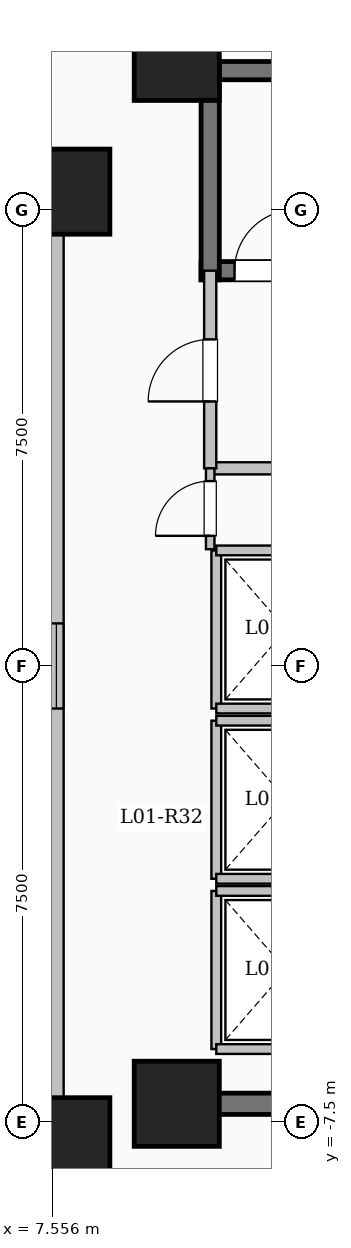
"""IFC4 building model, lengths in metres.
Left out: names, types, materials, properties, quantities, classifications, styles, units other than length and angle.
Written with IfcOpenShell. Run it as: python <this file> out.ifc"""

import sys

from ifc_helpers import new_model, si_unit, direction, frame, frame_2d, origin, origin_2d, place, context, subcontext, project, spatial, rectangle, extrude, element, fill, save


model = new_model("IFC4")
c1 = context("Model", 3, precision=1e-05, world=origin(), true_north=direction((0.0, 1.0)))
c2 = subcontext(c1, "Body", "Model", "MODEL_VIEW")
j1 = project(units=[si_unit("LENGTHUNIT", "METRE"), si_unit("PLANEANGLEUNIT", "RADIAN")], contexts=[c1])
p1 = place(None, origin())
s1 = spatial("IfcSite", under=j1, at=p1, CompositionType="ELEMENT")
p2 = place(p1, origin())
s2 = spatial("IfcBuilding", under=s1, at=p2, CompositionType="ELEMENT")
p3 = place(p2, frame((0.0, 0.0, 5.4)))
s3 = spatial("IfcBuildingStorey", under=s2, at=p3, CompositionType="ELEMENT", Elevation=5.4)
for number, where, z_axis, x_axis in (
    (1, (7.8, -7.8, 0.0), (0.0, 0.0, 1.0), (1.0, 0.0, 0.0)),
    (2, (7.8, 7.8, 0.0), (0.0, 0.0, 1.0), (1.0, 0.0, 0.0)),
    (3, (9.6, -7.2, 0.0), (0.0, 0.0, 1.0), (1.0, 0.0, 0.0)),
    (4, (9.6, 10.0, 0.0), (0.0, 0.0, 1.0), (1.0, 0.0, 0.0)),
):
    element("IfcColumn", number, at=place(p3, frame(where, z_axis=z_axis, x_axis=x_axis)), inside=s3, PredefinedType="COLUMN", context=c2, shape_type="SweptSolid", body=[
        extrude(rectangle(XDim=1.4, YDim=1.4, at=origin_2d()), origin(), (0.0, 0.0, 1.0), 4.5),
    ])
p4 = place(p3, frame((-7.62, -7.62, 0.0), z_axis=(0.0, 0.0, 1.0), x_axis=(1.0, 0.0, 0.0)))
e5 = element("IfcWall", 5, at=p4, inside=s3, PredefinedType="SOLIDWALL", context=c2, shape_type="SweptSolid", body=[
    extrude(rectangle(XDim=15.24, YDim=0.24, at=frame_2d((7.62, 0.0))), origin(), (0.0, 0.0, 1.0), 4.2),
])
p5 = place(p4, frame((6.92, 0.0, 0.95)))
e6 = element("IfcOpeningElement", 6, at=p5, cuts=e5, PredefinedType="OPENING", context=c2, shape_type="SweptSolid", body=[
    extrude(rectangle(XDim=1.4, YDim=1.5, at=frame_2d((0.7, 0.75))), frame((0.0, 0.13, 0.0), z_axis=(0.0, -1.0, 0.0), x_axis=(1.0, 0.0, 0.0)), (0.0, 0.0, 1.0), 0.26),
])
p6 = place(p3, frame((7.62, -7.62, 0.0), z_axis=(0.0, 0.0, 1.0), x_axis=(0.0, 1.0, 0.0)))
e7 = element("IfcWall", 7, at=p6, inside=s3, PredefinedType="SOLIDWALL", context=c2, shape_type="SweptSolid", body=[
    extrude(rectangle(XDim=15.24, YDim=0.24, at=frame_2d((7.62, 0.0))), origin(), (0.0, 0.0, 1.0), 4.2),
])
p7 = place(p6, frame((6.92, 0.0, 0.95)))
e8 = element("IfcOpeningElement", 8, at=p7, cuts=e7, PredefinedType="OPENING", context=c2, shape_type="SweptSolid", body=[
    extrude(rectangle(XDim=1.4, YDim=1.5, at=frame_2d((0.7, 0.75))), frame((0.0, 0.13, 0.0), z_axis=(0.0, -1.0, 0.0), x_axis=(1.0, 0.0, 0.0)), (0.0, 0.0, 1.0), 0.26),
])
p8 = place(p3, frame((7.62, 7.62, 0.0), z_axis=(0.0, 0.0, 1.0), x_axis=(-1.0, 0.0, 0.0)))
e9 = element("IfcWall", 9, at=p8, inside=s3, PredefinedType="SOLIDWALL", context=c2, shape_type="SweptSolid", body=[
    extrude(rectangle(XDim=15.24, YDim=0.24, at=frame_2d((7.62, 0.0))), origin(), (0.0, 0.0, 1.0), 4.2),
])
p9 = place(p8, frame((6.92, 0.0, 0.95)))
e10 = element("IfcOpeningElement", 10, at=p9, cuts=e9, PredefinedType="OPENING", context=c2, shape_type="SweptSolid", body=[
    extrude(rectangle(XDim=1.4, YDim=1.5, at=frame_2d((0.7, 0.75))), frame((0.0, 0.13, 0.0), z_axis=(0.0, -1.0, 0.0), x_axis=(1.0, 0.0, 0.0)), (0.0, 0.0, 1.0), 0.26),
])
p10 = place(p3, frame((10.0, 9.79, 0.0), z_axis=(0.0, 0.0, 1.0), x_axis=(1.0, 0.0, 0.0)))
e11 = element("IfcWall", 11, at=p10, inside=s3, PredefinedType="SHEAR", context=c2, shape_type="SweptSolid", body=[
    extrude(rectangle(XDim=8.0, YDim=0.3, at=frame_2d((4.0, 0.0))), origin(), (0.0, 0.0, 1.0), 4.5),
])
p11 = place(p3, frame((10.0, 6.5, 0.0), z_axis=(0.0, 0.0, 1.0), x_axis=(1.0, 0.0, 0.0)))
e12 = element("IfcWall", 12, at=p11, inside=s3, PredefinedType="SHEAR", context=c2, shape_type="SweptSolid", body=[
    extrude(rectangle(XDim=8.0, YDim=0.3, at=frame_2d((4.0, 0.0))), origin(), (0.0, 0.0, 1.0), 4.5),
])
p12 = place(p11, frame((0.55, 0.0, 0.0)))
e13 = element("IfcOpeningElement", 13, at=p12, cuts=e12, PredefinedType="OPENING", context=c2, shape_type="SweptSolid", body=[
    extrude(rectangle(XDim=1.0, YDim=2.15, at=frame_2d((0.5, 1.075))), frame((0.0, 0.16, 0.0), z_axis=(0.0, -1.0, 0.0), x_axis=(1.0, 0.0, 0.0)), (0.0, 0.0, 1.0), 0.32),
])
p13 = place(p3, frame((10.15, 6.35, 0.0), z_axis=(0.0, 0.0, 1.0), x_axis=(0.0, 1.0, 0.0)))
e14 = element("IfcWall", 14, at=p13, inside=s3, PredefinedType="SHEAR", context=c2, shape_type="SweptSolid", body=[
    extrude(rectangle(XDim=3.59, YDim=0.3, at=frame_2d((1.795, 0.0))), origin(), (0.0, 0.0, 1.0), 4.5),
])
p14 = place(p3, frame((10.15, 3.25, 0.0), z_axis=(0.0, 0.0, 1.0), x_axis=(1.0, 0.0, 0.0)))
e15 = element("IfcWall", 15, at=p14, inside=s3, PredefinedType="SOLIDWALL", context=c2, shape_type="SweptSolid", body=[
    extrude(rectangle(XDim=5.4, YDim=0.2, at=frame_2d((2.7, 0.0))), origin(), (0.0, 0.0, 1.0), 4.2),
])
p15 = place(p3, frame((10.15, 3.25, 0.0), z_axis=(0.0, 0.0, 1.0), x_axis=(0.0, 1.0, 0.0)))
e16 = element("IfcWall", 16, at=p15, inside=s3, PredefinedType="SOLIDWALL", context=c2, shape_type="SweptSolid", body=[
    extrude(rectangle(XDim=3.25, YDim=0.2, at=frame_2d((1.625, 0.0))), origin(), (0.0, 0.0, 1.0), 4.2),
])
p16 = place(p15, frame((1.1, 0.0, 0.0)))
e17 = element("IfcOpeningElement", 17, at=p16, cuts=e16, PredefinedType="OPENING", context=c2, shape_type="SweptSolid", body=[
    extrude(rectangle(XDim=1.02, YDim=2.15, at=frame_2d((0.51, 1.075))), frame((0.0, 0.11, 0.0), z_axis=(0.0, -1.0, 0.0), x_axis=(1.0, 0.0, 0.0)), (0.0, 0.0, 1.0), 0.22),
])
p17 = place(p3, frame((10.25, -6.3, 0.0), z_axis=(0.0, 0.0, 1.0), x_axis=(0.0, 1.0, 0.0)))
e18 = element("IfcWall", 18, at=p17, inside=s3, PredefinedType="SOLIDWALL", context=c2, shape_type="SweptSolid", body=[
    extrude(rectangle(XDim=2.6, YDim=0.16, at=frame_2d((1.3, 0.0))), origin(), (0.0, 0.0, 1.0), 4.2),
])
for number, where, z_axis, x_axis in (
    (19, (10.25, -6.3, 0.0), (0.0, 0.0, 1.0), (1.0, 0.0, 0.0)),
    (20, (10.25, -3.7, 0.0), (0.0, 0.0, 1.0), (1.0, 0.0, 0.0)),
):
    element("IfcWall", number, at=place(p3, frame(where, z_axis=z_axis, x_axis=x_axis)), inside=s3, PredefinedType="SOLIDWALL", context=c2, shape_type="SweptSolid", body=[
        extrude(rectangle(XDim=2.3, YDim=0.16, at=frame_2d((1.15, 0.0))), origin(), (0.0, 0.0, 1.0), 4.2),
    ])
p18 = place(p3, frame((10.25, -3.5, 0.0), z_axis=(0.0, 0.0, 1.0), x_axis=(0.0, 1.0, 0.0)))
e21 = element("IfcWall", 21, at=p18, inside=s3, PredefinedType="SOLIDWALL", context=c2, shape_type="SweptSolid", body=[
    extrude(rectangle(XDim=2.6, YDim=0.16, at=frame_2d((1.3, 0.0))), origin(), (0.0, 0.0, 1.0), 4.2),
])
for number, where, z_axis, x_axis in (
    (22, (10.25, -3.5, 0.0), (0.0, 0.0, 1.0), (1.0, 0.0, 0.0)),
    (23, (10.25, -0.9, 0.0), (0.0, 0.0, 1.0), (1.0, 0.0, 0.0)),
):
    element("IfcWall", number, at=place(p3, frame(where, z_axis=z_axis, x_axis=x_axis)), inside=s3, PredefinedType="SOLIDWALL", context=c2, shape_type="SweptSolid", body=[
        extrude(rectangle(XDim=2.3, YDim=0.16, at=frame_2d((1.15, 0.0))), origin(), (0.0, 0.0, 1.0), 4.2),
    ])
p19 = place(p3, frame((10.25, -0.7, 0.0), z_axis=(0.0, 0.0, 1.0), x_axis=(0.0, 1.0, 0.0)))
e24 = element("IfcWall", 24, at=p19, inside=s3, PredefinedType="SOLIDWALL", context=c2, shape_type="SweptSolid", body=[
    extrude(rectangle(XDim=2.6, YDim=0.16, at=frame_2d((1.3, 0.0))), origin(), (0.0, 0.0, 1.0), 4.2),
])
for number, where, z_axis, x_axis in (
    (25, (10.25, -0.7, 0.0), (0.0, 0.0, 1.0), (1.0, 0.0, 0.0)),
    (26, (10.25, 1.9, 0.0), (0.0, 0.0, 1.0), (1.0, 0.0, 0.0)),
):
    element("IfcWall", number, at=place(p3, frame(where, z_axis=z_axis, x_axis=x_axis)), inside=s3, PredefinedType="SOLIDWALL", context=c2, shape_type="SweptSolid", body=[
        extrude(rectangle(XDim=2.3, YDim=0.16, at=frame_2d((1.15, 0.0))), origin(), (0.0, 0.0, 1.0), 4.2),
    ])
p20 = place(p3, frame((10.075, -7.2, 0.0), z_axis=(0.0, 0.0, 1.0), x_axis=(1.0, 0.0, 0.0)))
e27 = element("IfcWall", 27, at=p20, inside=s3, PredefinedType="SHEAR", context=c2, shape_type="SweptSolid", body=[
    extrude(rectangle(XDim=8.55, YDim=0.35, at=frame_2d((4.275, 0.0))), origin(), (0.0, 0.0, 1.0), 4.5),
])
p21 = place(p3, frame((10.15, 1.92, 0.0), z_axis=(0.0, 0.0, 1.0), x_axis=(0.0, 1.0, 0.0)))
e28 = element("IfcWall", 28, at=p21, inside=s3, PredefinedType="PARTITIONING", context=c2, shape_type="SweptSolid", body=[
    extrude(rectangle(XDim=1.33, YDim=0.14, at=frame_2d((0.665, 0.0))), origin(), (0.0, 0.0, 1.0), 4.2),
])
p22 = place(p21, frame((0.22, 0.0, 0.0)))
e29 = element("IfcOpeningElement", 29, at=p22, cuts=e28, PredefinedType="OPENING", context=c2, shape_type="SweptSolid", body=[
    extrude(rectangle(XDim=0.9, YDim=2.08, at=frame_2d((0.45, 1.04))), frame((0.0, 0.08, 0.0), z_axis=(0.0, -1.0, 0.0), x_axis=(1.0, 0.0, 0.0)), (0.0, 0.0, 1.0), 0.16),
])
p23 = place(p7, origin())
e30 = element("IfcWindow", 30, at=p23, inside=s3, PartitioningType="SINGLE_PANEL", PredefinedType="WINDOW", context=c2, shape_type="SweptSolid", body=[
    extrude(rectangle(XDim=1.4, YDim=1.5, at=frame_2d((0.7, 0.75))), frame((0.0, 0.03, 0.0), z_axis=(0.0, -1.0, 0.0), x_axis=(1.0, 0.0, 0.0)), (0.0, 0.0, 1.0), 0.06),
])
fill(e8, e30)
p24 = place(p12, origin())
e31 = element("IfcDoor", 31, at=p24, inside=s3, OperationType="SINGLE_SWING_RIGHT", PredefinedType="DOOR", context=c2, shape_type="SweptSolid", body=[
    extrude(rectangle(XDim=1.0, YDim=2.15, at=frame_2d((0.5, 1.075))), frame((0.0, 0.025, 0.0), z_axis=(0.0, -1.0, 0.0), x_axis=(1.0, 0.0, 0.0)), (0.0, 0.0, 1.0), 0.05),
])
fill(e13, e31)
p25 = place(p16, origin())
e32 = element("IfcDoor", 32, at=p25, inside=s3, OperationType="SINGLE_SWING_LEFT", PredefinedType="DOOR", context=c2, shape_type="SweptSolid", body=[
    extrude(rectangle(XDim=1.02, YDim=2.15, at=frame_2d((0.51, 1.075))), frame((0.0, 0.025, 0.0), z_axis=(0.0, -1.0, 0.0), x_axis=(1.0, 0.0, 0.0)), (0.0, 0.0, 1.0), 0.05),
])
fill(e17, e32)
p26 = place(p22, origin())
e33 = element("IfcDoor", 33, at=p26, inside=s3, OperationType="SINGLE_SWING_LEFT", PredefinedType="DOOR", context=c2, shape_type="SweptSolid", body=[
    extrude(rectangle(XDim=0.9, YDim=2.08, at=frame_2d((0.45, 1.04))), frame((0.0, 0.025, 0.0), z_axis=(0.0, -1.0, 0.0), x_axis=(1.0, 0.0, 0.0)), (0.0, 0.0, 1.0), 0.05),
])
fill(e29, e33)
save(model, sys.argv[1])
